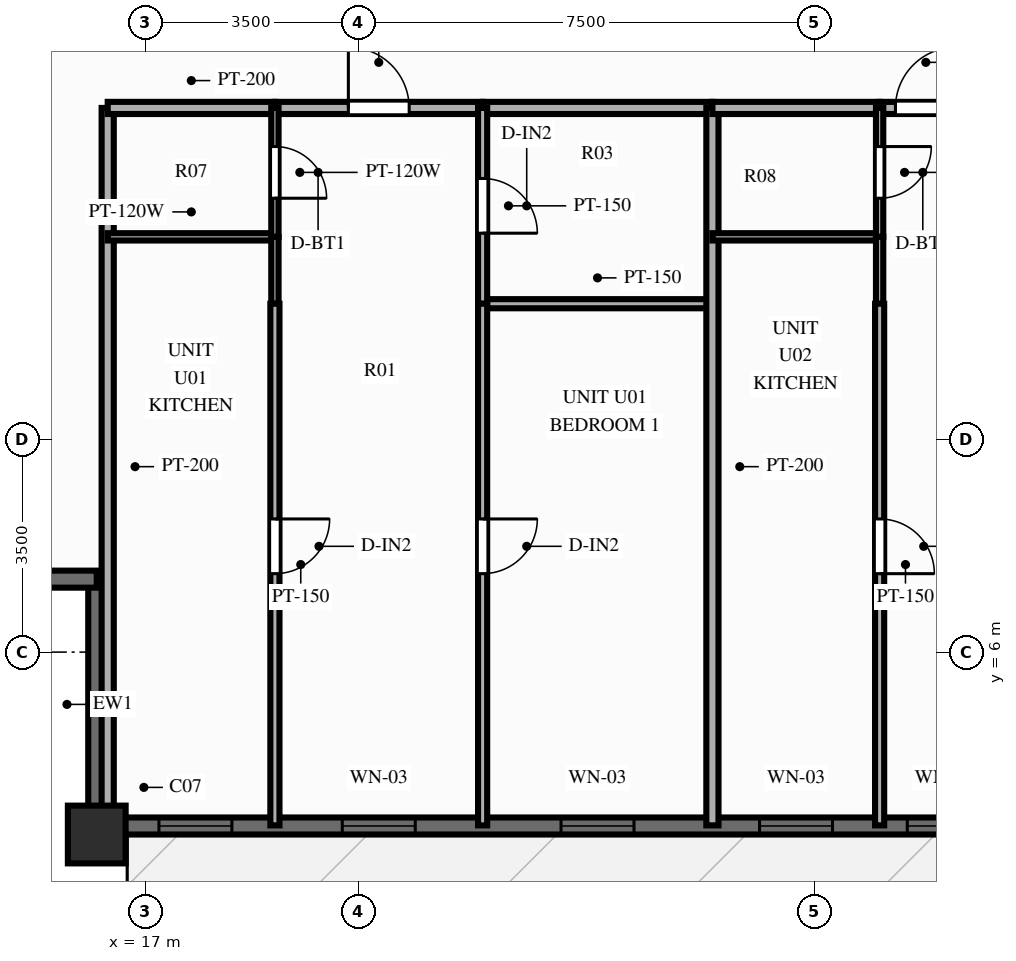
"""IFC4 building model, lengths in metres.
Left out: names, types, materials, properties, quantities, classifications, styles, units other than length and angle.
Written with IfcOpenShell. Run it as: python <this file> out.ifc"""

import sys

from ifc_helpers import new_model, si_unit, direction, frame, frame_2d, origin, origin_2d, place, context, subcontext, project, spatial, rectangle, extrude, source, transform, mapped, element, fill, save


model = new_model("IFC4")
c1 = context("Model", 3, precision=1e-05, world=origin(), true_north=direction((0.0, 1.0)))
c2 = subcontext(c1, "Body", "Model", "MODEL_VIEW")
j1 = project(units=[si_unit("LENGTHUNIT", "METRE"), si_unit("PLANEANGLEUNIT", "RADIAN")], contexts=[c1])
p1 = place(None, origin())
s1 = spatial("IfcSite", under=j1, at=p1, CompositionType="ELEMENT")
p2 = place(p1, origin())
s2 = spatial("IfcBuilding", under=s1, at=p2, CompositionType="ELEMENT")
p3 = place(p2, frame((0.0, 0.0, 86.85)))
s3 = spatial("IfcBuildingStorey", under=s2, at=p3, CompositionType="ELEMENT", Elevation=86.85)
m1 = source(origin(), c2, "Body", "SweptSolid", [
    extrude(rectangle(XDim=0.95, YDim=0.95, at=origin_2d()), origin(), (0.0, 0.0, 1.0), 3.0),
])
p4 = place(p3, frame((16.2, 3.0, 0.0), z_axis=(0.0, 0.0, 1.0), x_axis=(1.0, 0.0, 0.0)))
e1 = element("IfcColumn", 1, at=p4, inside=s3, PredefinedType="COLUMN", context=c2, shape_type="MappedRepresentation", body=[
    mapped(m1, transform((0.0, 0.0, 0.0), scale=1.0)),
])
p5 = place(p3, frame((16.2, 3.14, 0.0), z_axis=(0.0, 0.0, 1.0), x_axis=(1.0, 0.0, 0.0)))
e2 = element("IfcWall", 2, at=p5, inside=s3, PredefinedType="SOLIDWALL", context=c2, shape_type="SweptSolid", body=[
    extrude(rectangle(XDim=43.6, YDim=0.28, at=frame_2d((21.8, 0.0))), origin(), (0.0, 0.0, 1.0), 2.28),
])
p6 = place(p5, frame((1.022, 0.0, 0.25)))
e3 = element("IfcOpeningElement", 3, at=p6, cuts=e2, PredefinedType="OPENING", context=c2, shape_type="SweptSolid", body=[
    extrude(rectangle(XDim=1.2, YDim=1.5, at=frame_2d((0.6, 0.75))), frame((0.0, 0.152, 0.0), z_axis=(0.0, -1.0, 0.0), x_axis=(1.0, 0.0, 0.0)), (0.0, 0.0, 1.0), 0.304),
])
p7 = place(p5, frame((4.038, 0.0, 0.25)))
e4 = element("IfcOpeningElement", 4, at=p7, cuts=e2, PredefinedType="OPENING", context=c2, shape_type="SweptSolid", body=[
    extrude(rectangle(XDim=1.2, YDim=1.5, at=frame_2d((0.6, 0.75))), frame((0.0, 0.152, 0.0), z_axis=(0.0, -1.0, 0.0), x_axis=(1.0, 0.0, 0.0)), (0.0, 0.0, 1.0), 0.304),
])
p8 = place(p5, frame((7.635, 0.0, 0.25)))
e5 = element("IfcOpeningElement", 5, at=p8, cuts=e2, PredefinedType="OPENING", context=c2, shape_type="SweptSolid", body=[
    extrude(rectangle(XDim=1.2, YDim=1.5, at=frame_2d((0.6, 0.75))), frame((0.0, 0.152, 0.0), z_axis=(0.0, -1.0, 0.0), x_axis=(1.0, 0.0, 0.0)), (0.0, 0.0, 1.0), 0.304),
])
p9 = place(p5, frame((10.9, 0.0, 0.25)))
e6 = element("IfcOpeningElement", 6, at=p9, cuts=e2, PredefinedType="OPENING", context=c2, shape_type="SweptSolid", body=[
    extrude(rectangle(XDim=1.2, YDim=1.5, at=frame_2d((0.6, 0.75))), frame((0.0, 0.152, 0.0), z_axis=(0.0, -1.0, 0.0), x_axis=(1.0, 0.0, 0.0)), (0.0, 0.0, 1.0), 0.304),
])
p10 = place(p5, frame((13.33, 0.0, 0.25)))
e7 = element("IfcOpeningElement", 7, at=p10, cuts=e2, PredefinedType="OPENING", context=c2, shape_type="SweptSolid", body=[
    extrude(rectangle(XDim=1.2, YDim=1.5, at=frame_2d((0.6, 0.75))), frame((0.0, 0.152, 0.0), z_axis=(0.0, -1.0, 0.0), x_axis=(1.0, 0.0, 0.0)), (0.0, 0.0, 1.0), 0.304),
])
p11 = place(p5, frame((17.581, 0.0, 0.25)))
e8 = element("IfcOpeningElement", 8, at=p11, cuts=e2, PredefinedType="OPENING", context=c2, shape_type="SweptSolid", body=[
    extrude(rectangle(XDim=1.2, YDim=1.5, at=frame_2d((0.6, 0.75))), frame((0.0, 0.152, 0.0), z_axis=(0.0, -1.0, 0.0), x_axis=(1.0, 0.0, 0.0)), (0.0, 0.0, 1.0), 0.304),
])
p12 = place(p5, frame((20.988, 0.0, 0.25)))
e9 = element("IfcOpeningElement", 9, at=p12, cuts=e2, PredefinedType="OPENING", context=c2, shape_type="SweptSolid", body=[
    extrude(rectangle(XDim=1.2, YDim=1.5, at=frame_2d((0.6, 0.75))), frame((0.0, 0.152, 0.0), z_axis=(0.0, -1.0, 0.0), x_axis=(1.0, 0.0, 0.0)), (0.0, 0.0, 1.0), 0.304),
])
p13 = place(p5, frame((26.095, 0.0, 0.0), z_axis=(0.0, 0.0, 1.0), x_axis=(-1.0, 0.0, 0.0)))
e10 = element("IfcOpeningElement", 10, at=p13, cuts=e2, PredefinedType="OPENING", context=c2, shape_type="SweptSolid", body=[
    extrude(rectangle(XDim=1.1, YDim=2.15, at=frame_2d((0.55, 1.075))), frame((0.0, 0.152, 0.0), z_axis=(0.0, -1.0, 0.0), x_axis=(1.0, 0.0, 0.0)), (0.0, 0.0, 1.0), 0.304),
])
p14 = place(p5, frame((29.58, 0.0, 0.25)))
e11 = element("IfcOpeningElement", 11, at=p14, cuts=e2, PredefinedType="OPENING", context=c2, shape_type="SweptSolid", body=[
    extrude(rectangle(XDim=1.2, YDim=1.5, at=frame_2d((0.6, 0.75))), frame((0.0, 0.152, 0.0), z_axis=(0.0, -1.0, 0.0), x_axis=(1.0, 0.0, 0.0)), (0.0, 0.0, 1.0), 0.304),
])
p15 = place(p5, frame((32.663, 0.0, 0.25)))
e12 = element("IfcOpeningElement", 12, at=p15, cuts=e2, PredefinedType="OPENING", context=c2, shape_type="SweptSolid", body=[
    extrude(rectangle(XDim=1.2, YDim=1.5, at=frame_2d((0.6, 0.75))), frame((0.0, 0.152, 0.0), z_axis=(0.0, -1.0, 0.0), x_axis=(1.0, 0.0, 0.0)), (0.0, 0.0, 1.0), 0.304),
])
p16 = place(p5, frame((36.632, 0.0, 0.25)))
e13 = element("IfcOpeningElement", 13, at=p16, cuts=e2, PredefinedType="OPENING", context=c2, shape_type="SweptSolid", body=[
    extrude(rectangle(XDim=1.2, YDim=1.5, at=frame_2d((0.6, 0.75))), frame((0.0, 0.152, 0.0), z_axis=(0.0, -1.0, 0.0), x_axis=(1.0, 0.0, 0.0)), (0.0, 0.0, 1.0), 0.304),
])
p17 = place(p5, frame((40.885, 0.0, 0.25)))
e14 = element("IfcOpeningElement", 14, at=p17, cuts=e2, PredefinedType="OPENING", context=c2, shape_type="SweptSolid", body=[
    extrude(rectangle(XDim=1.2, YDim=1.5, at=frame_2d((0.6, 0.75))), frame((0.0, 0.152, 0.0), z_axis=(0.0, -1.0, 0.0), x_axis=(1.0, 0.0, 0.0)), (0.0, 0.0, 1.0), 0.304),
])
for number, where, z_axis, x_axis in (
    (15, (16.2, 3.08, 0.0), (0.0, 0.0, 1.0), (0.0, 1.0, 0.0)),
    (16, (12.08, 7.2, 0.0), (0.0, 0.0, 1.0), (1.0, 0.0, 0.0)),
):
    element("IfcWall", number, at=place(p3, frame(where, z_axis=z_axis, x_axis=x_axis)), inside=s3, PredefinedType="SOLIDWALL", context=c2, shape_type="SweptSolid", body=[
        extrude(rectangle(XDim=4.12, YDim=0.28, at=frame_2d((2.06, 0.0))), origin(), (0.0, 0.0, 1.0), 2.28),
    ])
p18 = place(p3, frame((16.38, 14.95, 0.0), z_axis=(0.0, 0.0, 1.0), x_axis=(0.0, -1.0, 0.0)))
e17 = element("IfcWall", 17, at=p18, inside=s3, PredefinedType="PARTITIONING", context=c2, shape_type="SweptSolid", body=[
    extrude(rectangle(XDim=11.8, YDim=0.2, at=frame_2d((5.9, 0.0))), origin(), (0.0, 0.0, 1.0), 2.79),
])
p19 = place(p3, frame((16.38, 14.95, 0.0), z_axis=(0.0, 0.0, 1.0), x_axis=(1.0, 0.0, 0.0)))
e18 = element("IfcWall", 18, at=p19, inside=s3, PredefinedType="PARTITIONING", context=c2, shape_type="SweptSolid", body=[
    extrude(rectangle(XDim=2.75, YDim=0.2, at=frame_2d((1.375, 0.0))), origin(), (0.0, 0.0, 1.0), 2.79),
])
p20 = place(p3, frame((19.13, 14.95, 0.0), z_axis=(0.0, 0.0, 1.0), x_axis=(1.0, 0.0, 0.0)))
e19 = element("IfcWall", 19, at=p20, inside=s3, PredefinedType="PARTITIONING", context=c2, shape_type="SweptSolid", body=[
    extrude(rectangle(XDim=3.416, YDim=0.2, at=frame_2d((1.708, 0.0))), origin(), (0.0, 0.0, 1.0), 2.79),
])
p21 = place(p20, frame((1.208, 0.0, 0.0)))
e20 = element("IfcOpeningElement", 20, at=p21, cuts=e19, PredefinedType="OPENING", context=c2, shape_type="SweptSolid", body=[
    extrude(rectangle(XDim=1.0, YDim=2.15, at=frame_2d((0.5, 1.075))), frame((0.0, 0.112, 0.0), z_axis=(0.0, -1.0, 0.0), x_axis=(1.0, 0.0, 0.0)), (0.0, 0.0, 1.0), 0.224),
])
p22 = place(p3, frame((22.546, 14.95, 0.0), z_axis=(0.0, 0.0, 1.0), x_axis=(1.0, 0.0, 0.0)))
e21 = element("IfcWall", 21, at=p22, inside=s3, PredefinedType="PARTITIONING", context=c2, shape_type="SweptSolid", body=[
    extrude(rectangle(XDim=3.779, YDim=0.2, at=frame_2d((1.89, 0.0))), origin(), (0.0, 0.0, 1.0), 2.79),
])
p23 = place(p3, frame((16.38, 12.83, 0.0), z_axis=(0.0, 0.0, 1.0), x_axis=(1.0, 0.0, 0.0)))
e22 = element("IfcWall", 22, at=p23, inside=s3, PredefinedType="PARTITIONING", context=c2, shape_type="SweptSolid", body=[
    extrude(rectangle(XDim=2.75, YDim=0.12, at=frame_2d((1.375, 0.0))), origin(), (0.0, 0.0, 1.0), 2.79),
])
p24 = place(p3, frame((22.546, 11.73, 0.0), z_axis=(0.0, 0.0, 1.0), x_axis=(1.0, 0.0, 0.0)))
e23 = element("IfcWall", 23, at=p24, inside=s3, PredefinedType="PARTITIONING", context=c2, shape_type="SweptSolid", body=[
    extrude(rectangle(XDim=3.779, YDim=0.15, at=frame_2d((1.89, 0.0))), origin(), (0.0, 0.0, 1.0), 2.79),
])
p25 = place(p3, frame((19.13, 14.95, 0.0), z_axis=(0.0, 0.0, 1.0), x_axis=(0.0, -1.0, 0.0)))
e24 = element("IfcWall", 24, at=p25, inside=s3, PredefinedType="PARTITIONING", context=c2, shape_type="SweptSolid", body=[
    extrude(rectangle(XDim=2.12, YDim=0.12, at=frame_2d((1.06, 0.0))), origin(), (0.0, 0.0, 1.0), 2.79),
])
p26 = place(p25, frame((0.635, 0.0, 0.0)))
e25 = element("IfcOpeningElement", 25, at=p26, cuts=e24, PredefinedType="OPENING", context=c2, shape_type="SweptSolid", body=[
    extrude(rectangle(XDim=0.85, YDim=2.05, at=frame_2d((0.425, 1.025))), frame((0.0, 0.072, 0.0), z_axis=(0.0, -1.0, 0.0), x_axis=(1.0, 0.0, 0.0)), (0.0, 0.0, 1.0), 0.144),
])
p27 = place(p3, frame((19.13, 12.83, 0.0), z_axis=(0.0, 0.0, 1.0), x_axis=(0.0, -1.0, 0.0)))
e26 = element("IfcWall", 26, at=p27, inside=s3, PredefinedType="PARTITIONING", context=c2, shape_type="SweptSolid", body=[
    extrude(rectangle(XDim=1.1, YDim=0.12, at=frame_2d((0.55, 0.0))), origin(), (0.0, 0.0, 1.0), 2.79),
])
p28 = place(p3, frame((19.13, 11.73, 0.0), z_axis=(0.0, 0.0, 1.0), x_axis=(0.0, -1.0, 0.0)))
e27 = element("IfcWall", 27, at=p28, inside=s3, PredefinedType="PARTITIONING", context=c2, shape_type="SweptSolid", body=[
    extrude(rectangle(XDim=8.58, YDim=0.15, at=frame_2d((4.29, 0.0))), origin(), (0.0, 0.0, 1.0), 2.79),
])
p29 = place(p28, frame((3.54, 0.0, 0.0)))
e28 = element("IfcOpeningElement", 28, at=p29, cuts=e27, PredefinedType="OPENING", context=c2, shape_type="SweptSolid", body=[
    extrude(rectangle(XDim=0.9, YDim=2.1, at=frame_2d((0.45, 1.05))), frame((0.0, 0.087, 0.0), z_axis=(0.0, -1.0, 0.0), x_axis=(1.0, 0.0, 0.0)), (0.0, 0.0, 1.0), 0.174),
])
p30 = place(p3, frame((22.546, 14.95, 0.0), z_axis=(0.0, 0.0, 1.0), x_axis=(0.0, -1.0, 0.0)))
e29 = element("IfcWall", 29, at=p30, inside=s3, PredefinedType="PARTITIONING", context=c2, shape_type="SweptSolid", body=[
    extrude(rectangle(XDim=3.22, YDim=0.15, at=frame_2d((1.61, 0.0))), origin(), (0.0, 0.0, 1.0), 2.79),
])
p31 = place(p30, frame((1.16, 0.0, 0.0)))
e30 = element("IfcOpeningElement", 30, at=p31, cuts=e29, PredefinedType="OPENING", context=c2, shape_type="SweptSolid", body=[
    extrude(rectangle(XDim=0.9, YDim=2.1, at=frame_2d((0.45, 1.05))), frame((0.0, 0.087, 0.0), z_axis=(0.0, -1.0, 0.0), x_axis=(1.0, 0.0, 0.0)), (0.0, 0.0, 1.0), 0.174),
])
p32 = place(p3, frame((22.546, 11.73, 0.0), z_axis=(0.0, 0.0, 1.0), x_axis=(0.0, -1.0, 0.0)))
e31 = element("IfcWall", 31, at=p32, inside=s3, PredefinedType="PARTITIONING", context=c2, shape_type="SweptSolid", body=[
    extrude(rectangle(XDim=8.58, YDim=0.15, at=frame_2d((4.29, 0.0))), origin(), (0.0, 0.0, 1.0), 2.79),
])
p33 = place(p32, frame((3.54, 0.0, 0.0)))
e32 = element("IfcOpeningElement", 32, at=p33, cuts=e31, PredefinedType="OPENING", context=c2, shape_type="SweptSolid", body=[
    extrude(rectangle(XDim=0.9, YDim=2.1, at=frame_2d((0.45, 1.05))), frame((0.0, 0.087, 0.0), z_axis=(0.0, -1.0, 0.0), x_axis=(1.0, 0.0, 0.0)), (0.0, 0.0, 1.0), 0.174),
])
p34 = place(p3, frame((26.325, 14.95, 0.0), z_axis=(0.0, 0.0, 1.0), x_axis=(0.0, -1.0, 0.0)))
e33 = element("IfcWall", 33, at=p34, inside=s3, PredefinedType="PARTITIONING", context=c2, shape_type="SweptSolid", body=[
    extrude(rectangle(XDim=11.8, YDim=0.2, at=frame_2d((5.9, 0.0))), origin(), (0.0, 0.0, 1.0), 2.79),
])
p35 = place(p3, frame((26.325, 14.95, 0.0), z_axis=(0.0, 0.0, 1.0), x_axis=(1.0, 0.0, 0.0)))
e34 = element("IfcWall", 34, at=p35, inside=s3, PredefinedType="PARTITIONING", context=c2, shape_type="SweptSolid", body=[
    extrude(rectangle(XDim=2.75, YDim=0.2, at=frame_2d((1.375, 0.0))), origin(), (0.0, 0.0, 1.0), 2.79),
])
p36 = place(p3, frame((29.075, 14.95, 0.0), z_axis=(0.0, 0.0, 1.0), x_axis=(1.0, 0.0, 0.0)))
e35 = element("IfcWall", 35, at=p36, inside=s3, PredefinedType="PARTITIONING", context=c2, shape_type="SweptSolid", body=[
    extrude(rectangle(XDim=3.416, YDim=0.2, at=frame_2d((1.708, 0.0))), origin(), (0.0, 0.0, 1.0), 2.79),
])
p37 = place(p36, frame((0.26, 0.0, 0.0)))
e36 = element("IfcOpeningElement", 36, at=p37, cuts=e35, PredefinedType="OPENING", context=c2, shape_type="SweptSolid", body=[
    extrude(rectangle(XDim=1.0, YDim=2.15, at=frame_2d((0.5, 1.075))), frame((0.0, 0.112, 0.0), z_axis=(0.0, -1.0, 0.0), x_axis=(1.0, 0.0, 0.0)), (0.0, 0.0, 1.0), 0.224),
])
p38 = place(p3, frame((26.325, 12.83, 0.0), z_axis=(0.0, 0.0, 1.0), x_axis=(1.0, 0.0, 0.0)))
e37 = element("IfcWall", 37, at=p38, inside=s3, PredefinedType="PARTITIONING", context=c2, shape_type="SweptSolid", body=[
    extrude(rectangle(XDim=2.75, YDim=0.12, at=frame_2d((1.375, 0.0))), origin(), (0.0, 0.0, 1.0), 2.79),
])
p39 = place(p3, frame((29.075, 14.95, 0.0), z_axis=(0.0, 0.0, 1.0), x_axis=(0.0, -1.0, 0.0)))
e38 = element("IfcWall", 38, at=p39, inside=s3, PredefinedType="PARTITIONING", context=c2, shape_type="SweptSolid", body=[
    extrude(rectangle(XDim=2.12, YDim=0.12, at=frame_2d((1.06, 0.0))), origin(), (0.0, 0.0, 1.0), 2.79),
])
p40 = place(p39, frame((0.635, 0.0, 0.0)))
e39 = element("IfcOpeningElement", 39, at=p40, cuts=e38, PredefinedType="OPENING", context=c2, shape_type="SweptSolid", body=[
    extrude(rectangle(XDim=0.85, YDim=2.05, at=frame_2d((0.425, 1.025))), frame((0.0, 0.072, 0.0), z_axis=(0.0, -1.0, 0.0), x_axis=(1.0, 0.0, 0.0)), (0.0, 0.0, 1.0), 0.144),
])
p41 = place(p3, frame((29.075, 12.83, 0.0), z_axis=(0.0, 0.0, 1.0), x_axis=(0.0, -1.0, 0.0)))
e40 = element("IfcWall", 40, at=p41, inside=s3, PredefinedType="PARTITIONING", context=c2, shape_type="SweptSolid", body=[
    extrude(rectangle(XDim=1.1, YDim=0.12, at=frame_2d((0.55, 0.0))), origin(), (0.0, 0.0, 1.0), 2.79),
])
p42 = place(p3, frame((29.075, 11.73, 0.0), z_axis=(0.0, 0.0, 1.0), x_axis=(0.0, -1.0, 0.0)))
e41 = element("IfcWall", 41, at=p42, inside=s3, PredefinedType="PARTITIONING", context=c2, shape_type="SweptSolid", body=[
    extrude(rectangle(XDim=8.58, YDim=0.15, at=frame_2d((4.29, 0.0))), origin(), (0.0, 0.0, 1.0), 2.79),
])
p43 = place(p42, frame((3.54, 0.0, 0.0)))
e42 = element("IfcOpeningElement", 42, at=p43, cuts=e41, PredefinedType="OPENING", context=c2, shape_type="SweptSolid", body=[
    extrude(rectangle(XDim=0.9, YDim=2.1, at=frame_2d((0.45, 1.05))), frame((0.0, 0.087, 0.0), z_axis=(0.0, -1.0, 0.0), x_axis=(1.0, 0.0, 0.0)), (0.0, 0.0, 1.0), 0.174),
])
m2 = source(origin(), c2, "Body", "SweptSolid", [
    extrude(rectangle(XDim=1.2, YDim=1.5, at=frame_2d((0.6, 0.75))), frame((0.0, 0.03, 0.0), z_axis=(0.0, -1.0, 0.0), x_axis=(1.0, 0.0, 0.0)), (0.0, 0.0, 1.0), 0.06),
])
p44 = place(p6, origin())
e43 = element("IfcWindow", 43, at=p44, inside=s3, PartitioningType="SINGLE_PANEL", PredefinedType="WINDOW", context=c2, shape_type="MappedRepresentation", body=[
    mapped(m2, transform((0.0, 0.0, 0.0), scale=1.0)),
])
fill(e3, e43)
p45 = place(p7, origin())
e44 = element("IfcWindow", 44, at=p45, inside=s3, PartitioningType="SINGLE_PANEL", PredefinedType="WINDOW", context=c2, shape_type="MappedRepresentation", body=[
    mapped(m2, transform((0.0, 0.0, 0.0), scale=1.0)),
])
fill(e4, e44)
p46 = place(p8, origin())
e45 = element("IfcWindow", 45, at=p46, inside=s3, PartitioningType="SINGLE_PANEL", PredefinedType="WINDOW", context=c2, shape_type="MappedRepresentation", body=[
    mapped(m2, transform((0.0, 0.0, 0.0), scale=1.0)),
])
fill(e5, e45)
p47 = place(p9, origin())
e46 = element("IfcWindow", 46, at=p47, inside=s3, PartitioningType="SINGLE_PANEL", PredefinedType="WINDOW", context=c2, shape_type="MappedRepresentation", body=[
    mapped(m2, transform((0.0, 0.0, 0.0), scale=1.0)),
])
fill(e6, e46)
p48 = place(p10, origin())
e47 = element("IfcWindow", 47, at=p48, inside=s3, PartitioningType="SINGLE_PANEL", PredefinedType="WINDOW", context=c2, shape_type="MappedRepresentation", body=[
    mapped(m2, transform((0.0, 0.0, 0.0), scale=1.0)),
])
fill(e7, e47)
m3 = source(origin(), c2, "Body", "SweptSolid", [
    extrude(rectangle(XDim=1.0, YDim=2.15, at=frame_2d((0.5, 1.075))), frame((0.0, 0.025, 0.0), z_axis=(0.0, -1.0, 0.0), x_axis=(1.0, 0.0, 0.0)), (0.0, 0.0, 1.0), 0.05),
])
p49 = place(p21, origin())
e48 = element("IfcDoor", 48, at=p49, inside=s3, OperationType="SINGLE_SWING_LEFT", PredefinedType="DOOR", context=c2, shape_type="MappedRepresentation", body=[
    mapped(m3, transform((0.0, 0.0, 0.0), scale=1.0)),
])
fill(e20, e48)
m4 = source(origin(), c2, "Body", "SweptSolid", [
    extrude(rectangle(XDim=0.85, YDim=2.05, at=frame_2d((0.425, 1.025))), frame((0.0, 0.025, 0.0), z_axis=(0.0, -1.0, 0.0), x_axis=(1.0, 0.0, 0.0)), (0.0, 0.0, 1.0), 0.05),
])
p50 = place(p26, origin())
e49 = element("IfcDoor", 49, at=p50, inside=s3, OperationType="SINGLE_SWING_RIGHT", PredefinedType="DOOR", context=c2, shape_type="MappedRepresentation", body=[
    mapped(m4, transform((0.0, 0.0, 0.0), scale=1.0)),
])
fill(e25, e49)
m5 = source(origin(), c2, "Body", "SweptSolid", [
    extrude(rectangle(XDim=0.9, YDim=2.1, at=frame_2d((0.45, 1.05))), frame((0.0, 0.025, 0.0), z_axis=(0.0, -1.0, 0.0), x_axis=(1.0, 0.0, 0.0)), (0.0, 0.0, 1.0), 0.05),
])
p51 = place(p29, origin())
e50 = element("IfcDoor", 50, at=p51, inside=s3, OperationType="SINGLE_SWING_LEFT", PredefinedType="DOOR", context=c2, shape_type="MappedRepresentation", body=[
    mapped(m5, transform((0.0, 0.0, 0.0), scale=1.0)),
])
fill(e28, e50)
p52 = place(p31, origin())
e51 = element("IfcDoor", 51, at=p52, inside=s3, OperationType="SINGLE_SWING_RIGHT", PredefinedType="DOOR", context=c2, shape_type="MappedRepresentation", body=[
    mapped(m5, transform((0.0, 0.0, 0.0), scale=1.0)),
])
fill(e30, e51)
p53 = place(p33, origin())
e52 = element("IfcDoor", 52, at=p53, inside=s3, OperationType="SINGLE_SWING_LEFT", PredefinedType="DOOR", context=c2, shape_type="MappedRepresentation", body=[
    mapped(m5, transform((0.0, 0.0, 0.0), scale=1.0)),
])
fill(e32, e52)
p54 = place(p37, origin())
e53 = element("IfcDoor", 53, at=p54, inside=s3, OperationType="SINGLE_SWING_RIGHT", PredefinedType="DOOR", context=c2, shape_type="MappedRepresentation", body=[
    mapped(m3, transform((0.0, 0.0, 0.0), scale=1.0)),
])
fill(e36, e53)
p55 = place(p40, origin())
e54 = element("IfcDoor", 54, at=p55, inside=s3, OperationType="SINGLE_SWING_LEFT", PredefinedType="DOOR", context=c2, shape_type="MappedRepresentation", body=[
    mapped(m4, transform((0.0, 0.0, 0.0), scale=1.0)),
])
fill(e39, e54)
p56 = place(p43, origin())
e55 = element("IfcDoor", 55, at=p56, inside=s3, OperationType="SINGLE_SWING_RIGHT", PredefinedType="DOOR", context=c2, shape_type="MappedRepresentation", body=[
    mapped(m5, transform((0.0, 0.0, 0.0), scale=1.0)),
])
fill(e42, e55)
save(model, sys.argv[1])
